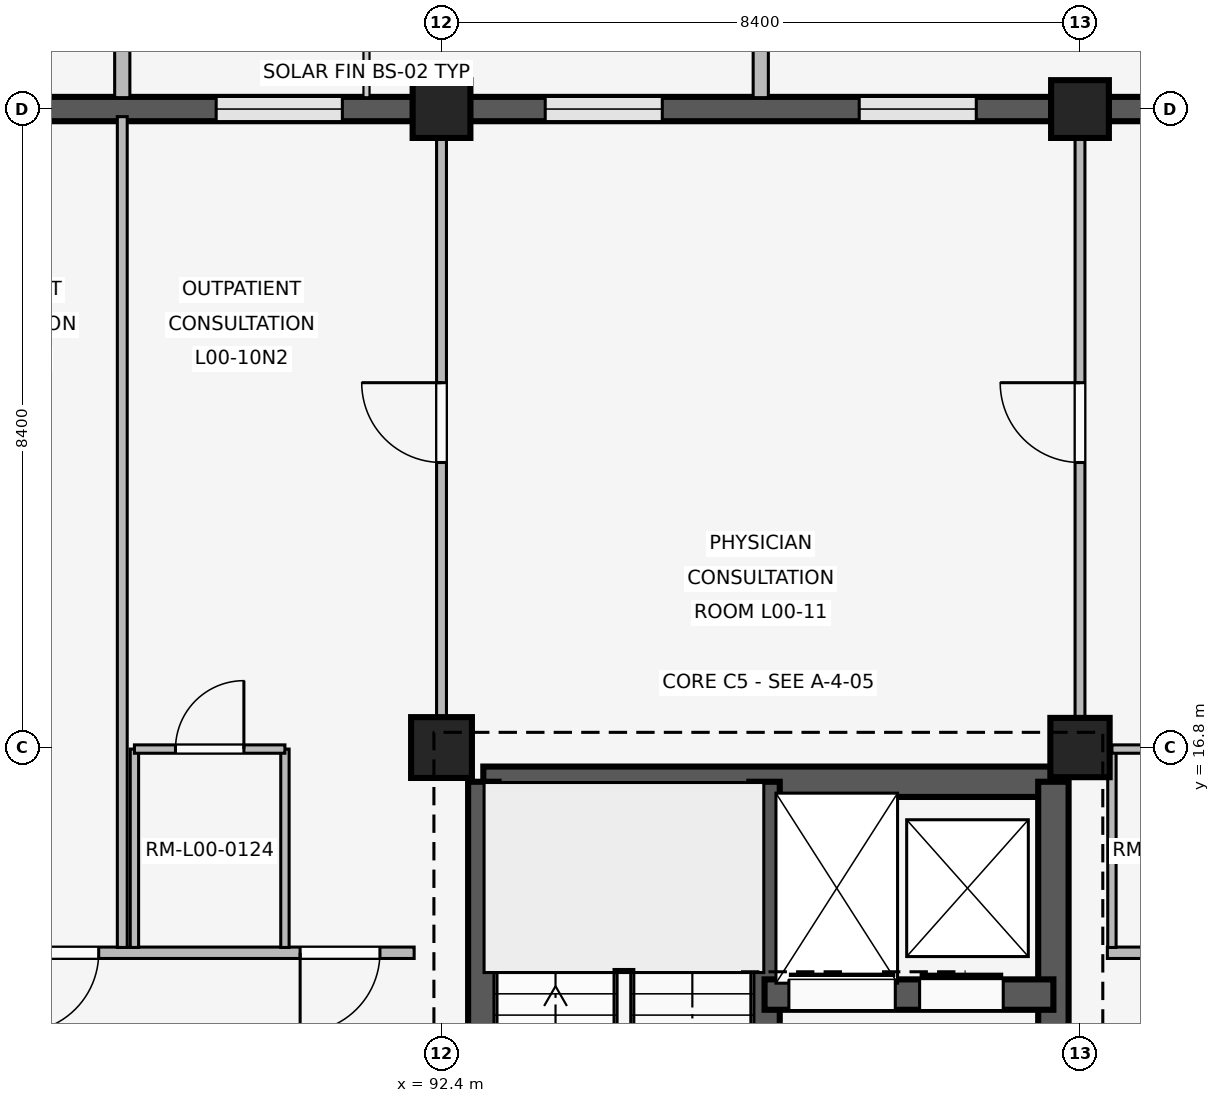
"""IFC4 building model, lengths in metres.
Left out: names, types, materials, properties, quantities, classifications, styles, units other than length and angle.
Written with IfcOpenShell. Run it as: python <this file> out.ifc"""

import sys

from ifc_helpers import new_model, si_unit, direction, frame, frame_2d, origin, origin_2d, place, context, subcontext, project, spatial, rectangle, extrude, element, fill, save


model = new_model("IFC4")
c1 = context("Model", 3, precision=1e-05, world=origin(), true_north=direction((0.0, 1.0)))
c2 = subcontext(c1, "Body", "Model", "MODEL_VIEW")
j1 = project(units=[si_unit("LENGTHUNIT", "METRE"), si_unit("PLANEANGLEUNIT", "RADIAN")], contexts=[c1])
p1 = place(None, origin())
s1 = spatial("IfcSite", under=j1, at=p1, CompositionType="ELEMENT")
p2 = place(p1, origin())
s2 = spatial("IfcBuilding", under=s1, at=p2, CompositionType="ELEMENT")
p3 = place(p2, origin())
s3 = spatial("IfcBuildingStorey", under=s2, at=p3, CompositionType="ELEMENT", Elevation=0.0)
p4 = place(p3, frame((92.4, 16.8, 0.0), z_axis=(0.0, 0.0, 1.0), x_axis=(1.0, 0.0, 0.0)))
e1 = element("IfcColumn", 1, at=p4, inside=s3, PredefinedType="COLUMN", context=c2, shape_type="SweptSolid", body=[
    extrude(rectangle(XDim=0.8, YDim=0.8, at=origin_2d()), origin(), (0.0, 0.0, 1.0), 4.8),
])
p5 = place(p3, frame((92.4, 25.2, 0.0), z_axis=(0.0, 0.0, 1.0), x_axis=(1.0, 0.0, 0.0)))
e2 = element("IfcColumn", 2, at=p5, inside=s3, PredefinedType="COLUMN", context=c2, shape_type="SweptSolid", body=[
    extrude(rectangle(XDim=0.76, YDim=0.76, at=origin_2d()), origin(), (0.0, 0.0, 1.0), 4.8),
])
p6 = place(p3, frame((100.8, 16.8, 0.0), z_axis=(0.0, 0.0, 1.0), x_axis=(1.0, 0.0, 0.0)))
e3 = element("IfcColumn", 3, at=p6, inside=s3, PredefinedType="COLUMN", context=c2, shape_type="SweptSolid", body=[
    extrude(rectangle(XDim=0.78, YDim=0.78, at=origin_2d()), origin(), (0.0, 0.0, 1.0), 4.8),
])
p7 = place(p3, frame((100.8, 25.2, 0.0), z_axis=(0.0, 0.0, 1.0), x_axis=(1.0, 0.0, 0.0)))
e4 = element("IfcColumn", 4, at=p7, inside=s3, PredefinedType="COLUMN", context=c2, shape_type="SweptSolid", body=[
    extrude(rectangle(XDim=0.76, YDim=0.76, at=origin_2d()), origin(), (0.0, 0.0, 1.0), 4.8),
])
p8 = place(p3, frame((84.375, 25.2, 0.0), z_axis=(0.0, 0.0, 1.0), x_axis=(1.0, 0.0, 0.0)))
e5 = element("IfcWall", 5, at=p8, inside=s3, PredefinedType="SOLIDWALL", context=c2, shape_type="SweptSolid", body=[
    extrude(rectangle(XDim=7.65, YDim=0.32, at=frame_2d((3.825, 0.0))), origin(), (0.0, 0.0, 1.0), 3.82),
])
p9 = place(p8, frame((0.929, 0.0, 0.85)))
e6 = element("IfcOpeningElement", 6, at=p9, cuts=e5, PredefinedType="OPENING", context=c2, shape_type="SweptSolid", body=[
    extrude(rectangle(XDim=1.66, YDim=1.95, at=frame_2d((0.83, 0.975))), frame((0.0, 0.17, 0.0), z_axis=(0.0, -1.0, 0.0), x_axis=(1.0, 0.0, 0.0)), (0.0, 0.0, 1.0), 0.34),
])
p10 = place(p8, frame((5.061, 0.0, 0.85)))
e7 = element("IfcOpeningElement", 7, at=p10, cuts=e5, PredefinedType="OPENING", context=c2, shape_type="SweptSolid", body=[
    extrude(rectangle(XDim=1.66, YDim=1.95, at=frame_2d((0.83, 0.975))), frame((0.0, 0.17, 0.0), z_axis=(0.0, -1.0, 0.0), x_axis=(1.0, 0.0, 0.0)), (0.0, 0.0, 1.0), 0.34),
])
p11 = place(p3, frame((88.2, 25.35, 0.0), z_axis=(0.0, 0.0, 1.0), x_axis=(0.0, 1.0, 0.0)))
e8 = element("IfcWall", 8, at=p11, inside=s3, PredefinedType="ELEMENTEDWALL", context=c2, shape_type="SweptSolid", body=[
    extrude(rectangle(XDim=0.85, YDim=0.2, at=frame_2d((0.425, 0.0))), origin(), (0.0, 0.0, 1.0), 3.8),
])
p12 = place(p3, frame((92.775, 25.2, 0.0), z_axis=(0.0, 0.0, 1.0), x_axis=(1.0, 0.0, 0.0)))
e9 = element("IfcWall", 9, at=p12, inside=s3, PredefinedType="SOLIDWALL", context=c2, shape_type="SweptSolid", body=[
    extrude(rectangle(XDim=7.65, YDim=0.32, at=frame_2d((3.825, 0.0))), origin(), (0.0, 0.0, 1.0), 3.82),
])
p13 = place(p12, frame((0.99, 0.0, 0.85)))
e10 = element("IfcOpeningElement", 10, at=p13, cuts=e9, PredefinedType="OPENING", context=c2, shape_type="SweptSolid", body=[
    extrude(rectangle(XDim=1.54, YDim=1.85, at=frame_2d((0.77, 0.925))), frame((0.0, 0.17, 0.0), z_axis=(0.0, -1.0, 0.0), x_axis=(1.0, 0.0, 0.0)), (0.0, 0.0, 1.0), 0.34),
])
p14 = place(p12, frame((5.121, 0.0, 0.85)))
e11 = element("IfcOpeningElement", 11, at=p14, cuts=e9, PredefinedType="OPENING", context=c2, shape_type="SweptSolid", body=[
    extrude(rectangle(XDim=1.54, YDim=1.85, at=frame_2d((0.77, 0.925))), frame((0.0, 0.17, 0.0), z_axis=(0.0, -1.0, 0.0), x_axis=(1.0, 0.0, 0.0)), (0.0, 0.0, 1.0), 0.34),
])
p15 = place(p3, frame((96.6, 25.35, 0.0), z_axis=(0.0, 0.0, 1.0), x_axis=(0.0, 1.0, 0.0)))
e12 = element("IfcWall", 12, at=p15, inside=s3, PredefinedType="ELEMENTEDWALL", context=c2, shape_type="SweptSolid", body=[
    extrude(rectangle(XDim=0.85, YDim=0.2, at=frame_2d((0.425, 0.0))), origin(), (0.0, 0.0, 1.0), 3.8),
])
p16 = place(p3, frame((101.175, 25.2, 0.0), z_axis=(0.0, 0.0, 1.0), x_axis=(1.0, 0.0, 0.0)))
e13 = element("IfcWall", 13, at=p16, inside=s3, PredefinedType="SOLIDWALL", context=c2, shape_type="SweptSolid", body=[
    extrude(rectangle(XDim=7.65, YDim=0.32, at=frame_2d((3.825, 0.0))), origin(), (0.0, 0.0, 1.0), 3.82),
])
p17 = place(p16, frame((0.919, 0.0, 0.85)))
e14 = element("IfcOpeningElement", 14, at=p17, cuts=e13, PredefinedType="OPENING", context=c2, shape_type="SweptSolid", body=[
    extrude(rectangle(XDim=1.68, YDim=2.05, at=frame_2d((0.84, 1.025))), frame((0.0, 0.17, 0.0), z_axis=(0.0, -1.0, 0.0), x_axis=(1.0, 0.0, 0.0)), (0.0, 0.0, 1.0), 0.34),
])
p18 = place(p16, frame((5.051, 0.0, 0.85)))
e15 = element("IfcOpeningElement", 15, at=p18, cuts=e13, PredefinedType="OPENING", context=c2, shape_type="SweptSolid", body=[
    extrude(rectangle(XDim=1.68, YDim=2.05, at=frame_2d((0.84, 1.025))), frame((0.0, 0.17, 0.0), z_axis=(0.0, -1.0, 0.0), x_axis=(1.0, 0.0, 0.0)), (0.0, 0.0, 1.0), 0.34),
])
p19 = place(p3, frame((92.95, 16.35, 0.0), z_axis=(0.0, 0.0, 1.0), x_axis=(1.0, 0.0, 0.0)))
e16 = element("IfcWall", 16, at=p19, inside=s3, PredefinedType="SHEAR", context=c2, shape_type="SweptSolid", body=[
    extrude(rectangle(XDim=7.5, YDim=0.4, at=frame_2d((3.75, 0.0))), origin(), (0.0, 0.0, 1.0), 4.52),
])
p20 = place(p3, frame((92.95, 8.8, 0.0), z_axis=(0.0, 0.0, 1.0), x_axis=(0.0, 1.0, 0.0)))
e17 = element("IfcWall", 17, at=p20, inside=s3, PredefinedType="SHEAR", context=c2, shape_type="SweptSolid", body=[
    extrude(rectangle(XDim=7.55, YDim=0.4, at=frame_2d((3.775, 0.0))), origin(), (0.0, 0.0, 1.0), 4.52),
])
p21 = place(p20, frame((0.28, 0.0, 0.0)))
e18 = element("IfcOpeningElement", 18, at=p21, cuts=e17, PredefinedType="OPENING", context=c2, shape_type="SweptSolid", body=[
    extrude(rectangle(XDim=1.0, YDim=2.15, at=frame_2d((0.5, 1.075))), frame((0.0, 0.21, 0.0), z_axis=(0.0, -1.0, 0.0), x_axis=(1.0, 0.0, 0.0)), (0.0, 0.0, 1.0), 0.42),
])
p22 = place(p3, frame((100.45, 8.8, 0.0), z_axis=(0.0, 0.0, 1.0), x_axis=(0.0, 1.0, 0.0)))
e19 = element("IfcWall", 19, at=p22, inside=s3, PredefinedType="SHEAR", context=c2, shape_type="SweptSolid", body=[
    extrude(rectangle(XDim=7.55, YDim=0.4, at=frame_2d((3.775, 0.0))), origin(), (0.0, 0.0, 1.0), 4.52),
])
p23 = place(p22, frame((2.4, 0.0, 0.0)))
e20 = element("IfcOpeningElement", 20, at=p23, cuts=e19, PredefinedType="OPENING", context=c2, shape_type="SweptSolid", body=[
    extrude(rectangle(XDim=1.2, YDim=2.2, at=frame_2d((0.6, 1.1))), frame((0.0, 0.21, 0.0), z_axis=(0.0, -1.0, 0.0), x_axis=(1.0, 0.0, 0.0)), (0.0, 0.0, 1.0), 0.42),
])
p24 = place(p3, frame((96.65, 8.8, 0.0), z_axis=(0.0, 0.0, 1.0), x_axis=(0.0, 1.0, 0.0)))
e21 = element("IfcWall", 21, at=p24, inside=s3, PredefinedType="SHEAR", context=c2, shape_type="SweptSolid", body=[
    extrude(rectangle(XDim=7.55, YDim=0.4, at=frame_2d((3.775, 0.0))), origin(), (0.0, 0.0, 1.0), 4.52),
])
p25 = place(p24, frame((0.28, 0.0, 0.0)))
e22 = element("IfcOpeningElement", 22, at=p25, cuts=e21, PredefinedType="OPENING", context=c2, shape_type="SweptSolid", body=[
    extrude(rectangle(XDim=1.0, YDim=2.15, at=frame_2d((0.5, 1.075))), frame((0.0, 0.21, 0.0), z_axis=(0.0, -1.0, 0.0), x_axis=(1.0, 0.0, 0.0)), (0.0, 0.0, 1.0), 0.42),
])
p26 = place(p3, frame((96.65, 13.55, 0.0), z_axis=(0.0, 0.0, 1.0), x_axis=(1.0, 0.0, 0.0)))
e23 = element("IfcWall", 23, at=p26, inside=s3, PredefinedType="SHEAR", context=c2, shape_type="SweptSolid", body=[
    extrude(rectangle(XDim=3.8, YDim=0.4, at=frame_2d((1.9, 0.0))), origin(), (0.0, 0.0, 1.0), 4.52),
])
p27 = place(p26, frame((0.32, 0.0, 0.0)))
e24 = element("IfcOpeningElement", 24, at=p27, cuts=e23, PredefinedType="OPENING", context=c2, shape_type="SweptSolid", body=[
    extrude(rectangle(XDim=1.4, YDim=2.25, at=frame_2d((0.7, 1.125))), frame((0.0, 0.21, 0.0), z_axis=(0.0, -1.0, 0.0), x_axis=(1.0, 0.0, 0.0)), (0.0, 0.0, 1.0), 0.42),
])
p28 = place(p26, frame((2.04, 0.0, 0.0)))
e25 = element("IfcOpeningElement", 25, at=p28, cuts=e23, PredefinedType="OPENING", context=c2, shape_type="SweptSolid", body=[
    extrude(rectangle(XDim=1.1, YDim=2.15, at=frame_2d((0.55, 1.075))), frame((0.0, 0.21, 0.0), z_axis=(0.0, -1.0, 0.0), x_axis=(1.0, 0.0, 0.0)), (0.0, 0.0, 1.0), 0.42),
])
p29 = place(p3, frame((92.04, 14.1, 0.0), z_axis=(0.0, 0.0, 1.0), x_axis=(-1.0, 0.0, 0.0)))
e26 = element("IfcWall", 26, at=p29, inside=s3, PredefinedType="PARTITIONING", context=c2, shape_type="SweptSolid", body=[
    extrude(rectangle(XDim=7.96, YDim=0.15, at=frame_2d((3.98, 0.0))), origin(), (0.0, 0.0, 1.0), 3.8),
])
p30 = place(p29, frame((0.45, 0.0, 0.0)))
e27 = element("IfcOpeningElement", 27, at=p30, cuts=e26, PredefinedType="OPENING", context=c2, shape_type="SweptSolid", body=[
    extrude(rectangle(XDim=1.05, YDim=2.2, at=frame_2d((0.525, 1.1))), frame((0.0, 0.085, 0.0), z_axis=(0.0, -1.0, 0.0), x_axis=(1.0, 0.0, 0.0)), (0.0, 0.0, 1.0), 0.17),
])
p31 = place(p29, frame((4.15, 0.0, 0.0)))
e28 = element("IfcOpeningElement", 28, at=p31, cuts=e26, PredefinedType="OPENING", context=c2, shape_type="SweptSolid", body=[
    extrude(rectangle(XDim=1.05, YDim=2.2, at=frame_2d((0.525, 1.1))), frame((0.0, 0.085, 0.0), z_axis=(0.0, -1.0, 0.0), x_axis=(1.0, 0.0, 0.0)), (0.0, 0.0, 1.0), 0.17),
])
p32 = place(p3, frame((88.2, 14.17, 0.0), z_axis=(0.0, 0.0, 1.0), x_axis=(0.0, 1.0, 0.0)))
e29 = element("IfcWall", 29, at=p32, inside=s3, PredefinedType="PARTITIONING", context=c2, shape_type="SweptSolid", body=[
    extrude(rectangle(XDim=10.93, YDim=0.13, at=frame_2d((5.465, 0.0))), origin(), (0.0, 0.0, 1.0), 3.8),
])
for number, where, z_axis, x_axis in (
    (30, (88.36, 14.17, 0.0), (0.0, 0.0, 1.0), (0.0, 1.0, 0.0)),
    (31, (90.34, 14.17, 0.0), (0.0, 0.0, 1.0), (0.0, 1.0, 0.0)),
):
    element("IfcWall", number, at=place(p3, frame(where, z_axis=z_axis, x_axis=x_axis)), inside=s3, PredefinedType="PARTITIONING", context=c2, shape_type="SweptSolid", body=[
        extrude(rectangle(XDim=2.61, YDim=0.11, at=frame_2d((1.305, 0.0))), origin(), (0.0, 0.0, 1.0), 3.8),
    ])
p33 = place(p3, frame((88.36, 16.78, 0.0), z_axis=(0.0, 0.0, 1.0), x_axis=(1.0, 0.0, 0.0)))
e32 = element("IfcWall", 32, at=p33, inside=s3, PredefinedType="PARTITIONING", context=c2, shape_type="SweptSolid", body=[
    extrude(rectangle(XDim=1.98, YDim=0.11, at=frame_2d((0.99, 0.0))), origin(), (0.0, 0.0, 1.0), 3.8),
])
p34 = place(p33, frame((0.54, 0.0, 0.0)))
e33 = element("IfcOpeningElement", 33, at=p34, cuts=e32, PredefinedType="OPENING", context=c2, shape_type="SweptSolid", body=[
    extrude(rectangle(XDim=0.9, YDim=2.1, at=frame_2d((0.45, 1.05))), frame((0.0, 0.065, 0.0), z_axis=(0.0, -1.0, 0.0), x_axis=(1.0, 0.0, 0.0)), (0.0, 0.0, 1.0), 0.13),
])
p35 = place(p3, frame((92.4, 17.15, 0.0), z_axis=(0.0, 0.0, 1.0), x_axis=(0.0, 1.0, 0.0)))
e34 = element("IfcWall", 34, at=p35, inside=s3, PredefinedType="PARTITIONING", context=c2, shape_type="SweptSolid", body=[
    extrude(rectangle(XDim=7.91, YDim=0.13, at=frame_2d((3.955, 0.0))), origin(), (0.0, 0.0, 1.0), 3.8),
])
p36 = place(p35, frame((3.4, 0.0, 0.0)))
e35 = element("IfcOpeningElement", 35, at=p36, cuts=e34, PredefinedType="OPENING", context=c2, shape_type="SweptSolid", body=[
    extrude(rectangle(XDim=1.05, YDim=2.2, at=frame_2d((0.525, 1.1))), frame((0.0, 0.075, 0.0), z_axis=(0.0, -1.0, 0.0), x_axis=(1.0, 0.0, 0.0)), (0.0, 0.0, 1.0), 0.15),
])
p37 = place(p3, frame((100.8, 17.15, 0.0), z_axis=(0.0, 0.0, 1.0), x_axis=(0.0, 1.0, 0.0)))
e36 = element("IfcWall", 36, at=p37, inside=s3, PredefinedType="PARTITIONING", context=c2, shape_type="SweptSolid", body=[
    extrude(rectangle(XDim=7.91, YDim=0.13, at=frame_2d((3.955, 0.0))), origin(), (0.0, 0.0, 1.0), 3.8),
])
p38 = place(p37, frame((3.4, 0.0, 0.0)))
e37 = element("IfcOpeningElement", 37, at=p38, cuts=e36, PredefinedType="OPENING", context=c2, shape_type="SweptSolid", body=[
    extrude(rectangle(XDim=1.05, YDim=2.2, at=frame_2d((0.525, 1.1))), frame((0.0, 0.075, 0.0), z_axis=(0.0, -1.0, 0.0), x_axis=(1.0, 0.0, 0.0)), (0.0, 0.0, 1.0), 0.15),
])
p39 = place(p3, frame((109.12, 14.1, 0.0), z_axis=(0.0, 0.0, 1.0), x_axis=(-1.0, 0.0, 0.0)))
e38 = element("IfcWall", 38, at=p39, inside=s3, PredefinedType="PARTITIONING", context=c2, shape_type="SweptSolid", body=[
    extrude(rectangle(XDim=7.96, YDim=0.15, at=frame_2d((3.98, 0.0))), origin(), (0.0, 0.0, 1.0), 3.8),
])
p40 = place(p39, frame((0.73, 0.0, 0.0)))
e39 = element("IfcOpeningElement", 39, at=p40, cuts=e38, PredefinedType="OPENING", context=c2, shape_type="SweptSolid", body=[
    extrude(rectangle(XDim=1.05, YDim=2.2, at=frame_2d((0.525, 1.1))), frame((0.0, 0.085, 0.0), z_axis=(0.0, -1.0, 0.0), x_axis=(1.0, 0.0, 0.0)), (0.0, 0.0, 1.0), 0.17),
])
p41 = place(p39, frame((4.43, 0.0, 0.0)))
e40 = element("IfcOpeningElement", 40, at=p41, cuts=e38, PredefinedType="OPENING", context=c2, shape_type="SweptSolid", body=[
    extrude(rectangle(XDim=1.05, YDim=2.2, at=frame_2d((0.525, 1.1))), frame((0.0, 0.085, 0.0), z_axis=(0.0, -1.0, 0.0), x_axis=(1.0, 0.0, 0.0)), (0.0, 0.0, 1.0), 0.17),
])
p42 = place(p3, frame((101.22, 14.17, 0.0), z_axis=(0.0, 0.0, 1.0), x_axis=(0.0, 1.0, 0.0)))
e41 = element("IfcWall", 41, at=p42, inside=s3, PredefinedType="PARTITIONING", context=c2, shape_type="SweptSolid", body=[
    extrude(rectangle(XDim=2.61, YDim=0.11, at=frame_2d((1.305, 0.0))), origin(), (0.0, 0.0, 1.0), 3.8),
])
p43 = place(p3, frame((101.22, 16.78, 0.0), z_axis=(0.0, 0.0, 1.0), x_axis=(1.0, 0.0, 0.0)))
e42 = element("IfcWall", 42, at=p43, inside=s3, PredefinedType="PARTITIONING", context=c2, shape_type="SweptSolid", body=[
    extrude(rectangle(XDim=1.98, YDim=0.11, at=frame_2d((0.99, 0.0))), origin(), (0.0, 0.0, 1.0), 3.8),
])
p44 = place(p43, frame((0.54, 0.0, 0.0)))
e43 = element("IfcOpeningElement", 43, at=p44, cuts=e42, PredefinedType="OPENING", context=c2, shape_type="SweptSolid", body=[
    extrude(rectangle(XDim=0.9, YDim=2.1, at=frame_2d((0.45, 1.05))), frame((0.0, 0.065, 0.0), z_axis=(0.0, -1.0, 0.0), x_axis=(1.0, 0.0, 0.0)), (0.0, 0.0, 1.0), 0.13),
])
p45 = place(p10, origin())
e44 = element("IfcWindow", 44, at=p45, inside=s3, PartitioningType="SINGLE_PANEL", PredefinedType="WINDOW", context=c2, shape_type="SweptSolid", body=[
    extrude(rectangle(XDim=1.66, YDim=1.95, at=frame_2d((0.83, 0.975))), frame((0.0, 0.03, 0.0), z_axis=(0.0, -1.0, 0.0), x_axis=(1.0, 0.0, 0.0)), (0.0, 0.0, 1.0), 0.06),
])
fill(e7, e44)
p46 = place(p13, origin())
e45 = element("IfcWindow", 45, at=p46, inside=s3, PartitioningType="SINGLE_PANEL", PredefinedType="WINDOW", context=c2, shape_type="SweptSolid", body=[
    extrude(rectangle(XDim=1.54, YDim=1.85, at=frame_2d((0.77, 0.925))), frame((0.0, 0.03, 0.0), z_axis=(0.0, -1.0, 0.0), x_axis=(1.0, 0.0, 0.0)), (0.0, 0.0, 1.0), 0.06),
])
fill(e10, e45)
p47 = place(p14, origin())
e46 = element("IfcWindow", 46, at=p47, inside=s3, PartitioningType="SINGLE_PANEL", PredefinedType="WINDOW", context=c2, shape_type="SweptSolid", body=[
    extrude(rectangle(XDim=1.54, YDim=1.85, at=frame_2d((0.77, 0.925))), frame((0.0, 0.03, 0.0), z_axis=(0.0, -1.0, 0.0), x_axis=(1.0, 0.0, 0.0)), (0.0, 0.0, 1.0), 0.06),
])
fill(e11, e46)
p48 = place(p27, origin())
e47 = element("IfcDoor", 47, at=p48, inside=s3, OperationType="SLIDING_TO_LEFT", PredefinedType="DOOR", context=c2, shape_type="SweptSolid", body=[
    extrude(rectangle(XDim=1.4, YDim=2.25, at=frame_2d((0.7, 1.125))), frame((0.0, 0.025, 0.0), z_axis=(0.0, -1.0, 0.0), x_axis=(1.0, 0.0, 0.0)), (0.0, 0.0, 1.0), 0.05),
])
fill(e24, e47)
p49 = place(p28, origin())
e48 = element("IfcDoor", 48, at=p49, inside=s3, OperationType="SLIDING_TO_LEFT", PredefinedType="DOOR", context=c2, shape_type="SweptSolid", body=[
    extrude(rectangle(XDim=1.1, YDim=2.15, at=frame_2d((0.55, 1.075))), frame((0.0, 0.025, 0.0), z_axis=(0.0, -1.0, 0.0), x_axis=(1.0, 0.0, 0.0)), (0.0, 0.0, 1.0), 0.05),
])
fill(e25, e48)
p50 = place(p30, origin())
e49 = element("IfcDoor", 49, at=p50, inside=s3, OperationType="SINGLE_SWING_RIGHT", PredefinedType="DOOR", context=c2, shape_type="SweptSolid", body=[
    extrude(rectangle(XDim=1.05, YDim=2.2, at=frame_2d((0.525, 1.1))), frame((0.0, 0.025, 0.0), z_axis=(0.0, -1.0, 0.0), x_axis=(1.0, 0.0, 0.0)), (0.0, 0.0, 1.0), 0.05),
])
fill(e27, e49)
p51 = place(p31, origin())
e50 = element("IfcDoor", 50, at=p51, inside=s3, OperationType="SINGLE_SWING_RIGHT", PredefinedType="DOOR", context=c2, shape_type="SweptSolid", body=[
    extrude(rectangle(XDim=1.05, YDim=2.2, at=frame_2d((0.525, 1.1))), frame((0.0, 0.025, 0.0), z_axis=(0.0, -1.0, 0.0), x_axis=(1.0, 0.0, 0.0)), (0.0, 0.0, 1.0), 0.05),
])
fill(e28, e50)
p52 = place(p34, origin())
e51 = element("IfcDoor", 51, at=p52, inside=s3, OperationType="SINGLE_SWING_RIGHT", PredefinedType="DOOR", context=c2, shape_type="SweptSolid", body=[
    extrude(rectangle(XDim=0.9, YDim=2.1, at=frame_2d((0.45, 1.05))), frame((0.0, 0.025, 0.0), z_axis=(0.0, -1.0, 0.0), x_axis=(1.0, 0.0, 0.0)), (0.0, 0.0, 1.0), 0.05),
])
fill(e33, e51)
p53 = place(p36, origin())
e52 = element("IfcDoor", 52, at=p53, inside=s3, OperationType="SINGLE_SWING_RIGHT", PredefinedType="DOOR", context=c2, shape_type="SweptSolid", body=[
    extrude(rectangle(XDim=1.05, YDim=2.2, at=frame_2d((0.525, 1.1))), frame((0.0, 0.025, 0.0), z_axis=(0.0, -1.0, 0.0), x_axis=(1.0, 0.0, 0.0)), (0.0, 0.0, 1.0), 0.05),
])
fill(e35, e52)
p54 = place(p38, origin())
e53 = element("IfcDoor", 53, at=p54, inside=s3, OperationType="SINGLE_SWING_RIGHT", PredefinedType="DOOR", context=c2, shape_type="SweptSolid", body=[
    extrude(rectangle(XDim=1.05, YDim=2.2, at=frame_2d((0.525, 1.1))), frame((0.0, 0.025, 0.0), z_axis=(0.0, -1.0, 0.0), x_axis=(1.0, 0.0, 0.0)), (0.0, 0.0, 1.0), 0.05),
])
fill(e37, e53)
save(model, sys.argv[1])
